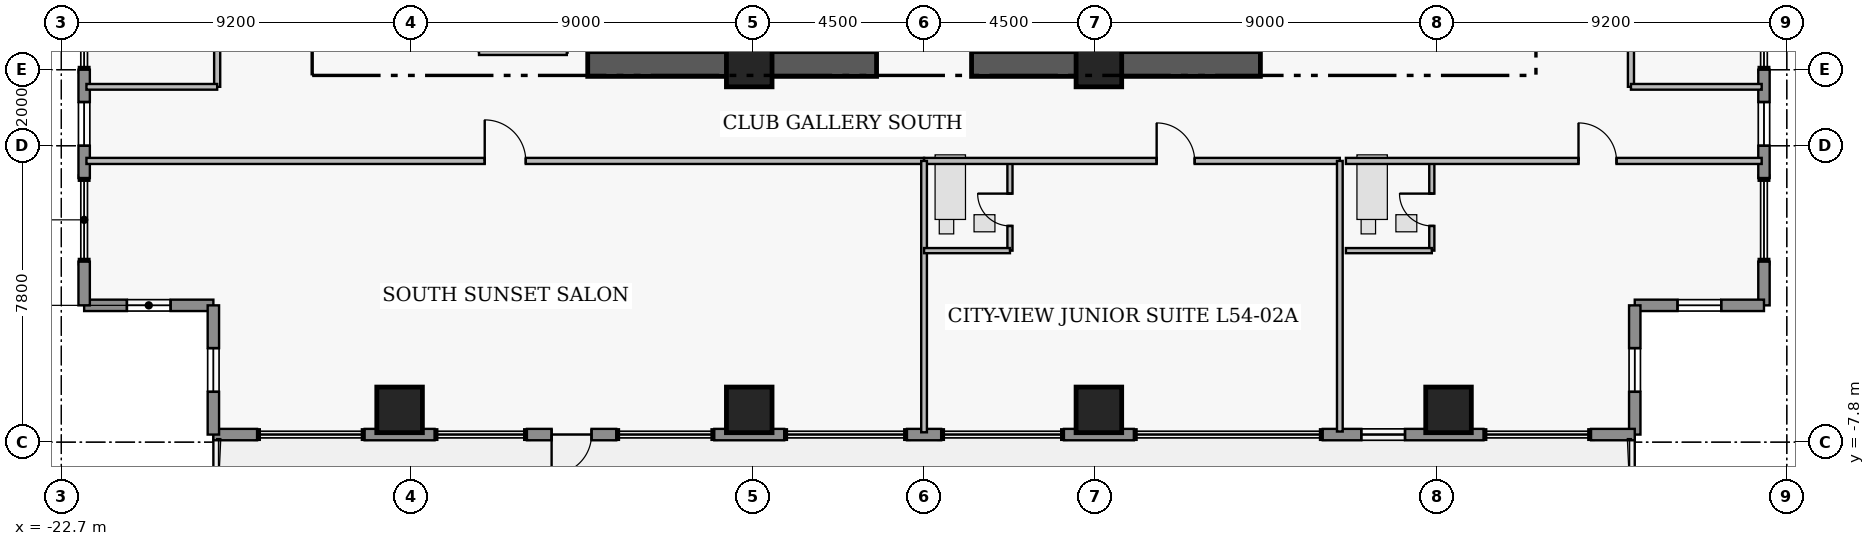
"""IFC4 building model, lengths in metres.
Left out: names, types, materials, properties, quantities, classifications, styles, units other than length and angle.
Written with IfcOpenShell. Run it as: python <this file> out.ifc"""

import sys

from ifc_helpers import new_model, si_unit, direction, frame, frame_2d, origin, origin_2d, place, context, subcontext, project, spatial, rectangle, extrude, element, fill, save


model = new_model("IFC4")
c1 = context("Model", 3, precision=1e-05, world=origin(), true_north=direction((0.0, 1.0)))
c2 = subcontext(c1, "Body", "Model", "MODEL_VIEW")
j1 = project(units=[si_unit("LENGTHUNIT", "METRE"), si_unit("PLANEANGLEUNIT", "RADIAN")], contexts=[c1])
p1 = place(None, origin())
s1 = spatial("IfcSite", under=j1, at=p1, CompositionType="ELEMENT")
p2 = place(p1, origin())
s2 = spatial("IfcBuilding", under=s1, at=p2, CompositionType="ELEMENT")
p3 = place(p2, frame((0.0, 0.0, 214.9)))
s3 = spatial("IfcBuildingStorey", under=s2, at=p3, CompositionType="ELEMENT", Elevation=214.9)
for number, where, z_axis, x_axis in (
    (1, (-8.85, 2.15, 0.0), (0.0, 0.0, 1.0), (1.0, 0.0, 0.0)),
    (2, (1.25, 2.15, 0.0), (0.0, 0.0, 1.0), (1.0, 0.0, 0.0)),
):
    element("IfcWall", number, at=place(p3, frame(where, z_axis=z_axis, x_axis=x_axis)), inside=s3, PredefinedType="SHEAR", context=c2, shape_type="SweptSolid", body=[
        extrude(rectangle(XDim=7.6, YDim=0.65, at=frame_2d((3.8, 0.0))), origin(), (0.0, 0.0, 1.0), 3.53),
    ])
for number, where, z_axis, x_axis in (
    (3, (-4.6, 2.15, 0.0), (0.0, 0.0, 1.0), (1.0, 0.0, 0.0)),
    (4, (4.6, 2.15, 0.0), (0.0, 0.0, 1.0), (1.0, 0.0, 0.0)),
    (5, (-13.8, -6.95, 0.0), (0.0, 0.0, 1.0), (1.0, 0.0, 0.0)),
    (6, (-4.6, -6.95, 0.0), (0.0, 0.0, 1.0), (1.0, 0.0, 0.0)),
    (7, (4.6, -6.95, 0.0), (0.0, 0.0, 1.0), (1.0, 0.0, 0.0)),
    (8, (13.8, -6.95, 0.0), (0.0, 0.0, 1.0), (1.0, 0.0, 0.0)),
):
    element("IfcColumn", number, at=place(p3, frame(where, z_axis=z_axis, x_axis=x_axis)), inside=s3, PredefinedType="COLUMN", context=c2, shape_type="SweptSolid", body=[
        extrude(rectangle(XDim=1.2, YDim=1.2, at=origin_2d()), origin(), (0.0, 0.0, 1.0), 3.75),
    ])
p4 = place(p3, frame((-18.7, -4.2, 0.0), z_axis=(0.0, 0.0, 1.0), x_axis=(-1.0, 0.0, 0.0)))
e9 = element("IfcWall", 9, at=p4, inside=s3, PredefinedType="STANDARD", context=c2, shape_type="SweptSolid", body=[
    extrude(rectangle(XDim=3.4, YDim=0.3, at=frame_2d((1.7, 0.0))), origin(), (0.0, 0.0, 1.0), 3.53),
])
p5 = place(p4, frame((1.125, 0.0, 1.25)))
e10 = element("IfcOpeningElement", 10, at=p5, cuts=e9, PredefinedType="OPENING", context=c2, shape_type="SweptSolid", body=[
    extrude(rectangle(XDim=1.15, YDim=1.55, at=frame_2d((0.575, 0.775))), frame((0.0, 0.16, 0.0), z_axis=(0.0, -1.0, 0.0), x_axis=(1.0, 0.0, 0.0)), (0.0, 0.0, 1.0), 0.32),
])
p6 = place(p3, frame((-22.1, -4.2, 0.0), z_axis=(0.0, 0.0, 1.0), x_axis=(0.0, 1.0, 0.0)))
e11 = element("IfcWall", 11, at=p6, inside=s3, PredefinedType="STANDARD", context=c2, shape_type="SweptSolid", body=[
    extrude(rectangle(XDim=1.15, YDim=0.3, at=frame_2d((0.575, 0.0))), origin(), (0.0, 0.0, 1.0), 3.53),
])
p7 = place(p3, frame((-22.1, -0.85, 0.0), z_axis=(0.0, 0.0, 1.0), x_axis=(0.0, 1.0, 0.0)))
e12 = element("IfcWall", 12, at=p7, inside=s3, PredefinedType="STANDARD", context=c2, shape_type="SweptSolid", body=[
    extrude(rectangle(XDim=2.85, YDim=0.3, at=frame_2d((1.425, 0.0))), origin(), (0.0, 0.0, 1.0), 3.53),
])
p8 = place(p7, frame((0.85, 0.0, 0.95)))
e13 = element("IfcOpeningElement", 13, at=p8, cuts=e12, PredefinedType="OPENING", context=c2, shape_type="SweptSolid", body=[
    extrude(rectangle(XDim=1.15, YDim=1.55, at=frame_2d((0.575, 0.775))), frame((0.0, 0.16, 0.0), z_axis=(0.0, -1.0, 0.0), x_axis=(1.0, 0.0, 0.0)), (0.0, 0.0, 1.0), 0.32),
])
p9 = place(p3, frame((22.1, 2.0, 0.0), z_axis=(0.0, 0.0, 1.0), x_axis=(0.0, -1.0, 0.0)))
e14 = element("IfcWall", 14, at=p9, inside=s3, PredefinedType="STANDARD", context=c2, shape_type="SweptSolid", body=[
    extrude(rectangle(XDim=2.85, YDim=0.3, at=frame_2d((1.425, 0.0))), origin(), (0.0, 0.0, 1.0), 3.53),
])
p10 = place(p9, frame((0.85, 0.0, 0.95)))
e15 = element("IfcOpeningElement", 15, at=p10, cuts=e14, PredefinedType="OPENING", context=c2, shape_type="SweptSolid", body=[
    extrude(rectangle(XDim=1.15, YDim=1.55, at=frame_2d((0.575, 0.775))), frame((0.0, 0.16, 0.0), z_axis=(0.0, -1.0, 0.0), x_axis=(1.0, 0.0, 0.0)), (0.0, 0.0, 1.0), 0.32),
])
p11 = place(p3, frame((22.1, -3.05, 0.0), z_axis=(0.0, 0.0, 1.0), x_axis=(0.0, -1.0, 0.0)))
e16 = element("IfcWall", 16, at=p11, inside=s3, PredefinedType="STANDARD", context=c2, shape_type="SweptSolid", body=[
    extrude(rectangle(XDim=1.15, YDim=0.3, at=frame_2d((0.575, 0.0))), origin(), (0.0, 0.0, 1.0), 3.53),
])
p12 = place(p3, frame((22.1, -4.2, 0.0), z_axis=(0.0, 0.0, 1.0), x_axis=(-1.0, 0.0, 0.0)))
e17 = element("IfcWall", 17, at=p12, inside=s3, PredefinedType="STANDARD", context=c2, shape_type="SweptSolid", body=[
    extrude(rectangle(XDim=3.4, YDim=0.3, at=frame_2d((1.7, 0.0))), origin(), (0.0, 0.0, 1.0), 3.53),
])
p13 = place(p12, frame((1.125, 0.0, 1.25)))
e18 = element("IfcOpeningElement", 18, at=p13, cuts=e17, PredefinedType="OPENING", context=c2, shape_type="SweptSolid", body=[
    extrude(rectangle(XDim=1.15, YDim=1.55, at=frame_2d((0.575, 0.775))), frame((0.0, 0.16, 0.0), z_axis=(0.0, -1.0, 0.0), x_axis=(1.0, 0.0, 0.0)), (0.0, 0.0, 1.0), 0.32),
])
p14 = place(p3, frame((18.7, -4.2, 0.0), z_axis=(0.0, 0.0, 1.0), x_axis=(0.0, -1.0, 0.0)))
e19 = element("IfcWall", 19, at=p14, inside=s3, PredefinedType="STANDARD", context=c2, shape_type="SweptSolid", body=[
    extrude(rectangle(XDim=3.4, YDim=0.3, at=frame_2d((1.7, 0.0))), origin(), (0.0, 0.0, 1.0), 3.53),
])
p15 = place(p14, frame((1.125, 0.0, 1.25)))
e20 = element("IfcOpeningElement", 20, at=p15, cuts=e19, PredefinedType="OPENING", context=c2, shape_type="SweptSolid", body=[
    extrude(rectangle(XDim=1.15, YDim=1.55, at=frame_2d((0.575, 0.775))), frame((0.0, 0.16, 0.0), z_axis=(0.0, -1.0, 0.0), x_axis=(1.0, 0.0, 0.0)), (0.0, 0.0, 1.0), 0.32),
])
p16 = place(p3, frame((18.7, -7.6, 0.0), z_axis=(0.0, 0.0, 1.0), x_axis=(-1.0, 0.0, 0.0)))
e21 = element("IfcWall", 21, at=p16, inside=s3, PredefinedType="STANDARD", context=c2, shape_type="SweptSolid", body=[
    extrude(rectangle(XDim=1.15, YDim=0.3, at=frame_2d((0.575, 0.0))), origin(), (0.0, 0.0, 1.0), 3.53),
])
p17 = place(p3, frame((14.72, -7.6, 0.0), z_axis=(0.0, 0.0, 1.0), x_axis=(-1.0, 0.0, 0.0)))
e22 = element("IfcWall", 22, at=p17, inside=s3, PredefinedType="STANDARD", context=c2, shape_type="SweptSolid", body=[
    extrude(rectangle(XDim=4.23, YDim=0.3, at=frame_2d((2.115, 0.0))), origin(), (0.0, 0.0, 1.0), 3.53),
])
p18 = place(p17, frame((2.065, 0.0, 0.95)))
e23 = element("IfcOpeningElement", 23, at=p18, cuts=e22, PredefinedType="OPENING", context=c2, shape_type="SweptSolid", body=[
    extrude(rectangle(XDim=1.15, YDim=1.55, at=frame_2d((0.575, 0.775))), frame((0.0, 0.16, 0.0), z_axis=(0.0, -1.0, 0.0), x_axis=(1.0, 0.0, 0.0)), (0.0, 0.0, 1.0), 0.32),
])
p19 = place(p3, frame((5.52, -7.6, 0.0), z_axis=(0.0, 0.0, 1.0), x_axis=(-1.0, 0.0, 0.0)))
e24 = element("IfcWall", 24, at=p19, inside=s3, PredefinedType="STANDARD", context=c2, shape_type="SweptSolid", body=[
    extrude(rectangle(XDim=1.84, YDim=0.3, at=frame_2d((0.92, 0.0))), origin(), (0.0, 0.0, 1.0), 3.53),
])
p20 = place(p3, frame((0.45, -7.6, 0.0), z_axis=(0.0, 0.0, 1.0), x_axis=(-1.0, 0.0, 0.0)))
e25 = element("IfcWall", 25, at=p20, inside=s3, PredefinedType="STANDARD", context=c2, shape_type="SweptSolid", body=[
    extrude(rectangle(XDim=0.9, YDim=0.3, at=frame_2d((0.45, 0.0))), origin(), (0.0, 0.0, 1.0), 3.53),
])
p21 = place(p3, frame((-3.68, -7.6, 0.0), z_axis=(0.0, 0.0, 1.0), x_axis=(-1.0, 0.0, 0.0)))
e26 = element("IfcWall", 26, at=p21, inside=s3, PredefinedType="STANDARD", context=c2, shape_type="SweptSolid", body=[
    extrude(rectangle(XDim=1.84, YDim=0.3, at=frame_2d((0.92, 0.0))), origin(), (0.0, 0.0, 1.0), 3.53),
])
p22 = place(p3, frame((-8.1, -7.6, 0.0), z_axis=(0.0, 0.0, 1.0), x_axis=(-1.0, 0.0, 0.0)))
e27 = element("IfcWall", 27, at=p22, inside=s3, PredefinedType="STANDARD", context=c2, shape_type="SweptSolid", body=[
    extrude(rectangle(XDim=2.35, YDim=0.3, at=frame_2d((1.175, 0.0))), origin(), (0.0, 0.0, 1.0), 3.53),
])
p23 = place(p22, frame((0.65, 0.0, 0.0)))
e28 = element("IfcOpeningElement", 28, at=p23, cuts=e27, PredefinedType="OPENING", context=c2, shape_type="SweptSolid", body=[
    extrude(rectangle(XDim=1.05, YDim=2.2, at=frame_2d((0.525, 1.1))), frame((0.0, 0.16, 0.0), z_axis=(0.0, -1.0, 0.0), x_axis=(1.0, 0.0, 0.0)), (0.0, 0.0, 1.0), 0.32),
])
p24 = place(p3, frame((-12.88, -7.6, 0.0), z_axis=(0.0, 0.0, 1.0), x_axis=(-1.0, 0.0, 0.0)))
e29 = element("IfcWall", 29, at=p24, inside=s3, PredefinedType="STANDARD", context=c2, shape_type="SweptSolid", body=[
    extrude(rectangle(XDim=1.84, YDim=0.3, at=frame_2d((0.92, 0.0))), origin(), (0.0, 0.0, 1.0), 3.53),
])
p25 = place(p3, frame((-17.55, -7.6, 0.0), z_axis=(0.0, 0.0, 1.0), x_axis=(-1.0, 0.0, 0.0)))
e30 = element("IfcWall", 30, at=p25, inside=s3, PredefinedType="STANDARD", context=c2, shape_type="SweptSolid", body=[
    extrude(rectangle(XDim=1.15, YDim=0.3, at=frame_2d((0.575, 0.0))), origin(), (0.0, 0.0, 1.0), 3.53),
])
p26 = place(p3, frame((-18.7, -7.6, 0.0), z_axis=(0.0, 0.0, 1.0), x_axis=(0.0, 1.0, 0.0)))
e31 = element("IfcWall", 31, at=p26, inside=s3, PredefinedType="STANDARD", context=c2, shape_type="SweptSolid", body=[
    extrude(rectangle(XDim=3.4, YDim=0.3, at=frame_2d((1.7, 0.0))), origin(), (0.0, 0.0, 1.0), 3.53),
])
p27 = place(p26, frame((1.125, 0.0, 1.25)))
e32 = element("IfcOpeningElement", 32, at=p27, cuts=e31, PredefinedType="OPENING", context=c2, shape_type="SweptSolid", body=[
    extrude(rectangle(XDim=1.15, YDim=1.55, at=frame_2d((0.575, 0.775))), frame((0.0, 0.16, 0.0), z_axis=(0.0, -1.0, 0.0), x_axis=(1.0, 0.0, 0.0)), (0.0, 0.0, 1.0), 0.32),
])
p28 = place(p3, frame((-22.04, -0.4, 0.0), z_axis=(0.0, 0.0, 1.0), x_axis=(1.0, 0.0, 0.0)))
e33 = element("IfcWall", 33, at=p28, inside=s3, PredefinedType="PARTITIONING", context=c2, shape_type="SweptSolid", body=[
    extrude(rectangle(XDim=22.04, YDim=0.16, at=frame_2d((11.02, 0.0))), origin(), (0.0, 0.0, 1.0), 3.53),
])
p29 = place(p28, frame((10.48, 0.0, 0.0)))
e34 = element("IfcOpeningElement", 34, at=p29, cuts=e33, PredefinedType="OPENING", context=c2, shape_type="SweptSolid", body=[
    extrude(rectangle(XDim=1.08, YDim=2.18, at=frame_2d((0.54, 1.09))), frame((0.0, 0.09, 0.0), z_axis=(0.0, -1.0, 0.0), x_axis=(1.0, 0.0, 0.0)), (0.0, 0.0, 1.0), 0.18),
])
p30 = place(p3, frame((2.26, -2.76, 0.0), z_axis=(0.0, 0.0, 1.0), x_axis=(0.0, 1.0, 0.0)))
e35 = element("IfcWall", 35, at=p30, inside=s3, PredefinedType="PLUMBINGWALL", context=c2, shape_type="SweptSolid", body=[
    extrude(rectangle(XDim=2.36, YDim=0.135, at=frame_2d((1.18, 0.0))), origin(), (0.0, 0.0, 1.0), 3.53),
])
p31 = place(p30, frame((0.65, 0.0, 0.0)))
e36 = element("IfcOpeningElement", 36, at=p31, cuts=e35, PredefinedType="OPENING", context=c2, shape_type="SweptSolid", body=[
    extrude(rectangle(XDim=0.85, YDim=2.1, at=frame_2d((0.425, 1.05))), frame((0.0, 0.077, 0.0), z_axis=(0.0, -1.0, 0.0), x_axis=(1.0, 0.0, 0.0)), (0.0, 0.0, 1.0), 0.155),
])
p32 = place(p3, frame((0.0, -0.4, 0.0), z_axis=(0.0, 0.0, 1.0), x_axis=(1.0, 0.0, 0.0)))
e37 = element("IfcWall", 37, at=p32, inside=s3, PredefinedType="PARTITIONING", context=c2, shape_type="SweptSolid", body=[
    extrude(rectangle(XDim=10.94, YDim=0.16, at=frame_2d((5.47, 0.0))), origin(), (0.0, 0.0, 1.0), 3.53),
])
p33 = place(p32, frame((6.12, 0.0, 0.0)))
e38 = element("IfcOpeningElement", 38, at=p33, cuts=e37, PredefinedType="OPENING", context=c2, shape_type="SweptSolid", body=[
    extrude(rectangle(XDim=1.0, YDim=2.15, at=frame_2d((0.5, 1.075))), frame((0.0, 0.09, 0.0), z_axis=(0.0, -1.0, 0.0), x_axis=(1.0, 0.0, 0.0)), (0.0, 0.0, 1.0), 0.18),
])
p34 = place(p3, frame((13.36, -2.76, 0.0), z_axis=(0.0, 0.0, 1.0), x_axis=(0.0, 1.0, 0.0)))
e39 = element("IfcWall", 39, at=p34, inside=s3, PredefinedType="PLUMBINGWALL", context=c2, shape_type="SweptSolid", body=[
    extrude(rectangle(XDim=2.36, YDim=0.135, at=frame_2d((1.18, 0.0))), origin(), (0.0, 0.0, 1.0), 2.923),
])
p35 = place(p34, frame((0.65, 0.0, 0.0)))
e40 = element("IfcOpeningElement", 40, at=p35, cuts=e39, PredefinedType="OPENING", context=c2, shape_type="SweptSolid", body=[
    extrude(rectangle(XDim=0.85, YDim=2.1, at=frame_2d((0.425, 1.05))), frame((0.0, 0.077, 0.0), z_axis=(0.0, -1.0, 0.0), x_axis=(1.0, 0.0, 0.0)), (0.0, 0.0, 1.0), 0.155),
])
p36 = place(p3, frame((11.1, -0.4, 0.0), z_axis=(0.0, 0.0, 1.0), x_axis=(1.0, 0.0, 0.0)))
e41 = element("IfcWall", 41, at=p36, inside=s3, PredefinedType="PARTITIONING", context=c2, shape_type="SweptSolid", body=[
    extrude(rectangle(XDim=10.94, YDim=0.16, at=frame_2d((5.47, 0.0))), origin(), (0.0, 0.0, 1.0), 3.53),
])
p37 = place(p36, frame((6.12, 0.0, 0.0)))
e42 = element("IfcOpeningElement", 42, at=p37, cuts=e41, PredefinedType="OPENING", context=c2, shape_type="SweptSolid", body=[
    extrude(rectangle(XDim=1.0, YDim=2.15, at=frame_2d((0.5, 1.075))), frame((0.0, 0.09, 0.0), z_axis=(0.0, -1.0, 0.0), x_axis=(1.0, 0.0, 0.0)), (0.0, 0.0, 1.0), 0.18),
])
p38 = place(p3, frame((18.6, 1.55, 0.0), z_axis=(0.0, 0.0, 1.0), x_axis=(0.0, 1.0, 0.0)))
e43 = element("IfcWall", 43, at=p38, inside=s3, PredefinedType="PARTITIONING", context=c2, shape_type="SweptSolid", body=[
    extrude(rectangle(XDim=5.2, YDim=0.16, at=frame_2d((2.6, 0.0))), origin(), (0.0, 0.0, 1.0), 3.53),
])
p39 = place(p38, frame((2.14, 0.0, 0.0)))
e44 = element("IfcOpeningElement", 44, at=p39, cuts=e43, PredefinedType="OPENING", context=c2, shape_type="SweptSolid", body=[
    extrude(rectangle(XDim=0.92, YDim=2.12, at=frame_2d((0.46, 1.06))), frame((0.0, 0.09, 0.0), z_axis=(0.0, -1.0, 0.0), x_axis=(1.0, 0.0, 0.0)), (0.0, 0.0, 1.0), 0.18),
])
p40 = place(p3, frame((-18.6, 1.55, 0.0), z_axis=(0.0, 0.0, 1.0), x_axis=(0.0, 1.0, 0.0)))
e45 = element("IfcWall", 45, at=p40, inside=s3, PredefinedType="PARTITIONING", context=c2, shape_type="SweptSolid", body=[
    extrude(rectangle(XDim=13.3, YDim=0.16, at=frame_2d((6.65, 0.0))), origin(), (0.0, 0.0, 1.0), 3.53),
])
p41 = place(p40, frame((6.175, 0.0, 0.0)))
e46 = element("IfcOpeningElement", 46, at=p41, cuts=e45, PredefinedType="OPENING", context=c2, shape_type="SweptSolid", body=[
    extrude(rectangle(XDim=0.95, YDim=2.15, at=frame_2d((0.475, 1.075))), frame((0.0, 0.09, 0.0), z_axis=(0.0, -1.0, 0.0), x_axis=(1.0, 0.0, 0.0)), (0.0, 0.0, 1.0), 0.18),
])
p42 = place(p3, frame((-11.71, 2.47, 0.0), z_axis=(0.0, 0.0, 1.0), x_axis=(1.0, 0.0, 0.0)))
e47 = element("IfcWall", 47, at=p42, inside=s3, PredefinedType="PARTITIONING", context=c2, shape_type="SweptSolid", body=[
    extrude(rectangle(XDim=2.31, YDim=0.165, at=frame_2d((1.155, 0.0))), origin(), (0.0, 0.0, 1.0), 2.43),
])
p43 = place(p3, frame((0.0, -7.54, 0.0), z_axis=(0.0, 0.0, 1.0), x_axis=(0.0, 1.0, 0.0)))
e48 = element("IfcWall", 48, at=p43, inside=s3, PredefinedType="PARTITIONING", context=c2, shape_type="SweptSolid", body=[
    extrude(rectangle(XDim=7.14, YDim=0.15, at=frame_2d((3.57, 0.0))), origin(), (0.0, 0.0, 1.0), 3.53),
])
p44 = place(p3, frame((0.0, -2.76, 0.0), z_axis=(0.0, 0.0, 1.0), x_axis=(1.0, 0.0, 0.0)))
e49 = element("IfcWall", 49, at=p44, inside=s3, PredefinedType="PLUMBINGWALL", context=c2, shape_type="SweptSolid", body=[
    extrude(rectangle(XDim=2.26, YDim=0.135, at=frame_2d((1.13, 0.0))), origin(), (0.0, 0.0, 1.0), 3.124),
])
p45 = place(p3, frame((10.94, -7.52, 0.0), z_axis=(0.0, 0.0, 1.0), x_axis=(0.0, 1.0, 0.0)))
e50 = element("IfcWall", 50, at=p45, inside=s3, PredefinedType="PARTITIONING", context=c2, shape_type="SweptSolid", body=[
    extrude(rectangle(XDim=7.12, YDim=0.15, at=frame_2d((3.56, 0.0))), origin(), (0.0, 0.0, 1.0), 3.53),
])
p46 = place(p3, frame((11.1, -2.76, 0.0), z_axis=(0.0, 0.0, 1.0), x_axis=(1.0, 0.0, 0.0)))
e51 = element("IfcWall", 51, at=p46, inside=s3, PredefinedType="PLUMBINGWALL", context=c2, shape_type="SweptSolid", body=[
    extrude(rectangle(XDim=2.26, YDim=0.135, at=frame_2d((1.13, 0.0))), origin(), (0.0, 0.0, 1.0), 3.124),
])
for number, where, z_axis, x_axis in (
    (52, (18.6, 1.55, 0.0), (0.0, 0.0, 1.0), (1.0, 0.0, 0.0)),
    (53, (-22.04, 1.55, 0.0), (0.0, 0.0, 1.0), (1.0, 0.0, 0.0)),
):
    element("IfcWall", number, at=place(p3, frame(where, z_axis=z_axis, x_axis=x_axis)), inside=s3, PredefinedType="PARTITIONING", context=c2, shape_type="SweptSolid", body=[
        extrude(rectangle(XDim=3.44, YDim=0.15, at=frame_2d((1.72, 0.0))), origin(), (0.0, 0.0, 1.0), 3.53),
    ])
p47 = place(p5, origin())
e54 = element("IfcWindow", 54, at=p47, inside=s3, PartitioningType="SINGLE_PANEL", PredefinedType="WINDOW", context=c2, shape_type="SweptSolid", body=[
    extrude(rectangle(XDim=1.15, YDim=1.55, at=frame_2d((0.575, 0.775))), frame((0.0, 0.03, 0.0), z_axis=(0.0, -1.0, 0.0), x_axis=(1.0, 0.0, 0.0)), (0.0, 0.0, 1.0), 0.06),
])
fill(e10, e54)
p48 = place(p8, origin())
e55 = element("IfcWindow", 55, at=p48, inside=s3, PartitioningType="SINGLE_PANEL", PredefinedType="WINDOW", context=c2, shape_type="SweptSolid", body=[
    extrude(rectangle(XDim=1.15, YDim=1.55, at=frame_2d((0.575, 0.775))), frame((0.0, 0.03, 0.0), z_axis=(0.0, -1.0, 0.0), x_axis=(1.0, 0.0, 0.0)), (0.0, 0.0, 1.0), 0.06),
])
fill(e13, e55)
p49 = place(p10, origin())
e56 = element("IfcWindow", 56, at=p49, inside=s3, PartitioningType="SINGLE_PANEL", PredefinedType="WINDOW", context=c2, shape_type="SweptSolid", body=[
    extrude(rectangle(XDim=1.15, YDim=1.55, at=frame_2d((0.575, 0.775))), frame((0.0, 0.03, 0.0), z_axis=(0.0, -1.0, 0.0), x_axis=(1.0, 0.0, 0.0)), (0.0, 0.0, 1.0), 0.06),
])
fill(e15, e56)
p50 = place(p13, origin())
e57 = element("IfcWindow", 57, at=p50, inside=s3, PartitioningType="SINGLE_PANEL", PredefinedType="WINDOW", context=c2, shape_type="SweptSolid", body=[
    extrude(rectangle(XDim=1.15, YDim=1.55, at=frame_2d((0.575, 0.775))), frame((0.0, 0.03, 0.0), z_axis=(0.0, -1.0, 0.0), x_axis=(1.0, 0.0, 0.0)), (0.0, 0.0, 1.0), 0.06),
])
fill(e18, e57)
p51 = place(p15, origin())
e58 = element("IfcWindow", 58, at=p51, inside=s3, PartitioningType="SINGLE_PANEL", PredefinedType="WINDOW", context=c2, shape_type="SweptSolid", body=[
    extrude(rectangle(XDim=1.15, YDim=1.55, at=frame_2d((0.575, 0.775))), frame((0.0, 0.03, 0.0), z_axis=(0.0, -1.0, 0.0), x_axis=(1.0, 0.0, 0.0)), (0.0, 0.0, 1.0), 0.06),
])
fill(e20, e58)
p52 = place(p18, origin())
e59 = element("IfcWindow", 59, at=p52, inside=s3, PartitioningType="SINGLE_PANEL", PredefinedType="WINDOW", context=c2, shape_type="SweptSolid", body=[
    extrude(rectangle(XDim=1.15, YDim=1.55, at=frame_2d((0.575, 0.775))), frame((0.0, 0.03, 0.0), z_axis=(0.0, -1.0, 0.0), x_axis=(1.0, 0.0, 0.0)), (0.0, 0.0, 1.0), 0.06),
])
fill(e23, e59)
p53 = place(p23, origin())
e60 = element("IfcDoor", 60, at=p53, inside=s3, OperationType="SINGLE_SWING_RIGHT", PredefinedType="DOOR", context=c2, shape_type="SweptSolid", body=[
    extrude(rectangle(XDim=1.05, YDim=2.2, at=frame_2d((0.525, 1.1))), frame((0.0, 0.025, 0.0), z_axis=(0.0, -1.0, 0.0), x_axis=(1.0, 0.0, 0.0)), (0.0, 0.0, 1.0), 0.05),
])
fill(e28, e60)
p54 = place(p27, origin())
e61 = element("IfcWindow", 61, at=p54, inside=s3, PartitioningType="SINGLE_PANEL", PredefinedType="WINDOW", context=c2, shape_type="SweptSolid", body=[
    extrude(rectangle(XDim=1.15, YDim=1.55, at=frame_2d((0.575, 0.775))), frame((0.0, 0.03, 0.0), z_axis=(0.0, -1.0, 0.0), x_axis=(1.0, 0.0, 0.0)), (0.0, 0.0, 1.0), 0.06),
])
fill(e32, e61)
p55 = place(p29, origin())
e62 = element("IfcDoor", 62, at=p55, inside=s3, OperationType="SINGLE_SWING_LEFT", PredefinedType="DOOR", context=c2, shape_type="SweptSolid", body=[
    extrude(rectangle(XDim=1.08, YDim=2.18, at=frame_2d((0.54, 1.09))), frame((0.0, 0.025, 0.0), z_axis=(0.0, -1.0, 0.0), x_axis=(1.0, 0.0, 0.0)), (0.0, 0.0, 1.0), 0.05),
])
fill(e34, e62)
p56 = place(p31, origin())
e63 = element("IfcDoor", 63, at=p56, inside=s3, OperationType="SINGLE_SWING_RIGHT", PredefinedType="DOOR", context=c2, shape_type="SweptSolid", body=[
    extrude(rectangle(XDim=0.85, YDim=2.1, at=frame_2d((0.425, 1.05))), frame((0.0, 0.025, 0.0), z_axis=(0.0, -1.0, 0.0), x_axis=(1.0, 0.0, 0.0)), (0.0, 0.0, 1.0), 0.05),
])
fill(e36, e63)
p57 = place(p33, origin())
e64 = element("IfcDoor", 64, at=p57, inside=s3, OperationType="SINGLE_SWING_LEFT", PredefinedType="DOOR", context=c2, shape_type="SweptSolid", body=[
    extrude(rectangle(XDim=1.0, YDim=2.15, at=frame_2d((0.5, 1.075))), frame((0.0, 0.025, 0.0), z_axis=(0.0, -1.0, 0.0), x_axis=(1.0, 0.0, 0.0)), (0.0, 0.0, 1.0), 0.05),
])
fill(e38, e64)
p58 = place(p35, origin())
e65 = element("IfcDoor", 65, at=p58, inside=s3, OperationType="SINGLE_SWING_RIGHT", PredefinedType="DOOR", context=c2, shape_type="SweptSolid", body=[
    extrude(rectangle(XDim=0.85, YDim=2.1, at=frame_2d((0.425, 1.05))), frame((0.0, 0.025, 0.0), z_axis=(0.0, -1.0, 0.0), x_axis=(1.0, 0.0, 0.0)), (0.0, 0.0, 1.0), 0.05),
])
fill(e40, e65)
p59 = place(p37, origin())
e66 = element("IfcDoor", 66, at=p59, inside=s3, OperationType="SINGLE_SWING_LEFT", PredefinedType="DOOR", context=c2, shape_type="SweptSolid", body=[
    extrude(rectangle(XDim=1.0, YDim=2.15, at=frame_2d((0.5, 1.075))), frame((0.0, 0.025, 0.0), z_axis=(0.0, -1.0, 0.0), x_axis=(1.0, 0.0, 0.0)), (0.0, 0.0, 1.0), 0.05),
])
fill(e42, e66)
save(model, sys.argv[1])
